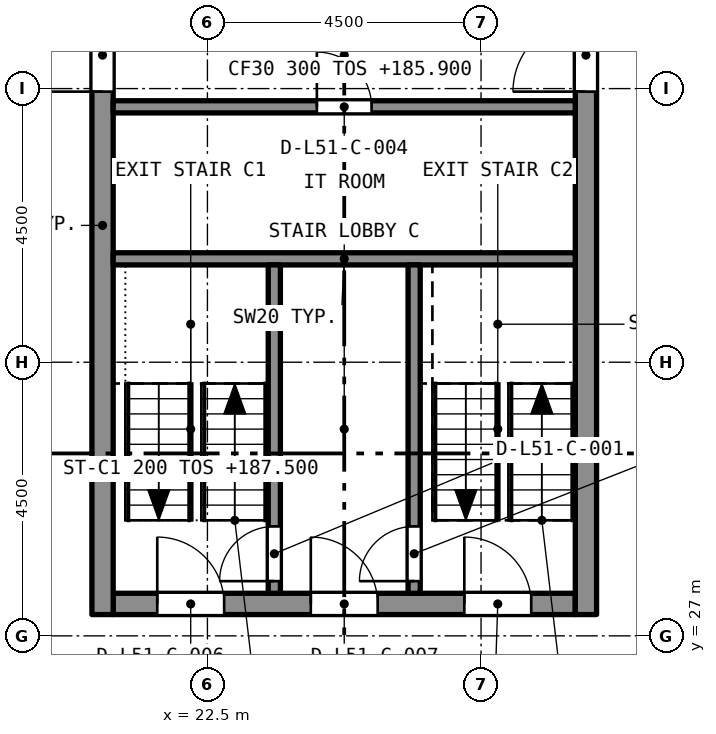
"""IFC4 building model, lengths in metres.
Left out: names, types, materials, properties, quantities, classifications, styles, units other than length and angle.
Written with IfcOpenShell. Run it as: python <this file> out.ifc"""

import sys

from ifc_helpers import new_model, si_unit, direction, frame, frame_2d, origin, place, context, subcontext, project, spatial, rectangle, extrude, element, fill, save


model = new_model("IFC4")
c1 = context("Model", 3, precision=1e-05, world=origin(), true_north=direction((0.0, 1.0)))
c2 = subcontext(c1, "Body", "Model", "MODEL_VIEW")
j1 = project(units=[si_unit("LENGTHUNIT", "METRE"), si_unit("PLANEANGLEUNIT", "RADIAN")], contexts=[c1])
p1 = place(None, origin())
s1 = spatial("IfcSite", under=j1, at=p1, CompositionType="ELEMENT")
p2 = place(p1, origin())
s2 = spatial("IfcBuilding", under=s1, at=p2, CompositionType="ELEMENT")
p3 = place(p2, frame((0.0, 0.0, 185.9)))
s3 = spatial("IfcBuildingStorey", under=s2, at=p3, CompositionType="ELEMENT", Elevation=185.9)
p4 = place(p3, frame((20.95, 27.525, 0.0), z_axis=(0.0, 0.0, 1.0), x_axis=(1.0, 0.0, 0.0)))
e1 = element("IfcWall", 1, at=p4, inside=s3, PredefinedType="SOLIDWALL", context=c2, shape_type="SweptSolid", body=[
    extrude(rectangle(XDim=7.6, YDim=0.35, at=frame_2d((3.8, 0.0))), origin(), (0.0, 0.0, 1.0), 3.2),
])
p5 = place(p4, frame((0.725, 0.0, 0.0)))
e2 = element("IfcOpeningElement", 2, at=p5, cuts=e1, PredefinedType="OPENING", context=c2, shape_type="SweptSolid", body=[
    extrude(rectangle(XDim=1.1, YDim=2.1, at=frame_2d((0.55, 1.05))), frame((0.0, 0.185, 0.0), z_axis=(0.0, -1.0, 0.0), x_axis=(1.0, 0.0, 0.0)), (0.0, 0.0, 1.0), 0.37),
])
p6 = place(p4, frame((3.25, 0.0, 0.0)))
e3 = element("IfcOpeningElement", 3, at=p6, cuts=e1, PredefinedType="OPENING", context=c2, shape_type="SweptSolid", body=[
    extrude(rectangle(XDim=1.1, YDim=2.1, at=frame_2d((0.55, 1.05))), frame((0.0, 0.185, 0.0), z_axis=(0.0, -1.0, 0.0), x_axis=(1.0, 0.0, 0.0)), (0.0, 0.0, 1.0), 0.37),
])
p7 = place(p4, frame((5.775, 0.0, 0.0)))
e4 = element("IfcOpeningElement", 4, at=p7, cuts=e1, PredefinedType="OPENING", context=c2, shape_type="SweptSolid", body=[
    extrude(rectangle(XDim=1.1, YDim=2.1, at=frame_2d((0.55, 1.05))), frame((0.0, 0.185, 0.0), z_axis=(0.0, -1.0, 0.0), x_axis=(1.0, 0.0, 0.0)), (0.0, 0.0, 1.0), 0.37),
])
p8 = place(p3, frame((20.775, 27.35, 0.0), z_axis=(0.0, 0.0, 1.0), x_axis=(0.0, 1.0, 0.0)))
e5 = element("IfcWall", 5, at=p8, inside=s3, PredefinedType="SOLIDWALL", context=c2, shape_type="SweptSolid", body=[
    extrude(rectangle(XDim=12.8, YDim=0.35, at=frame_2d((6.4, 0.0))), origin(), (0.0, 0.0, 1.0), 3.2),
])
p9 = place(p8, frame((8.6, 0.0, 0.0)))
e6 = element("IfcOpeningElement", 6, at=p9, cuts=e5, PredefinedType="OPENING", context=c2, shape_type="SweptSolid", body=[
    extrude(rectangle(XDim=1.2, YDim=2.1, at=frame_2d((0.6, 1.05))), frame((0.0, 0.185, 0.0), z_axis=(0.0, -1.0, 0.0), x_axis=(1.0, 0.0, 0.0)), (0.0, 0.0, 1.0), 0.37),
])
p10 = place(p3, frame((28.725, 27.35, 0.0), z_axis=(0.0, 0.0, 1.0), x_axis=(0.0, 1.0, 0.0)))
e7 = element("IfcWall", 7, at=p10, inside=s3, PredefinedType="SOLIDWALL", context=c2, shape_type="SweptSolid", body=[
    extrude(rectangle(XDim=12.8, YDim=0.35, at=frame_2d((6.4, 0.0))), origin(), (0.0, 0.0, 1.0), 3.2),
])
p11 = place(p10, frame((8.6, 0.0, 0.0)))
e8 = element("IfcOpeningElement", 8, at=p11, cuts=e7, PredefinedType="OPENING", context=c2, shape_type="SweptSolid", body=[
    extrude(rectangle(XDim=1.2, YDim=2.1, at=frame_2d((0.6, 1.05))), frame((0.0, 0.185, 0.0), z_axis=(0.0, -1.0, 0.0), x_axis=(1.0, 0.0, 0.0)), (0.0, 0.0, 1.0), 0.37),
])
p12 = place(p3, frame((20.95, 33.2, 0.0), z_axis=(0.0, 0.0, 1.0), x_axis=(1.0, 0.0, 0.0)))
e9 = element("IfcWall", 9, at=p12, inside=s3, PredefinedType="SOLIDWALL", context=c2, shape_type="SweptSolid", body=[
    extrude(rectangle(XDim=7.6, YDim=0.2, at=frame_2d((3.8, 0.0))), origin(), (0.0, 0.0, 1.0), 2.9),
])
p13 = place(p3, frame((20.95, 35.7, 0.0), z_axis=(0.0, 0.0, 1.0), x_axis=(1.0, 0.0, 0.0)))
e10 = element("IfcWall", 10, at=p13, inside=s3, PredefinedType="SOLIDWALL", context=c2, shape_type="SweptSolid", body=[
    extrude(rectangle(XDim=7.6, YDim=0.2, at=frame_2d((3.8, 0.0))), origin(), (0.0, 0.0, 1.0), 2.9),
])
p14 = place(p13, frame((3.35, 0.0, 0.0)))
e11 = element("IfcOpeningElement", 11, at=p14, cuts=e10, PredefinedType="OPENING", context=c2, shape_type="SweptSolid", body=[
    extrude(rectangle(XDim=0.9, YDim=2.1, at=frame_2d((0.45, 1.05))), frame((0.0, 0.11, 0.0), z_axis=(0.0, -1.0, 0.0), x_axis=(1.0, 0.0, 0.0)), (0.0, 0.0, 1.0), 0.22),
])
p15 = place(p3, frame((23.6, 27.7, 0.0), z_axis=(0.0, 0.0, 1.0), x_axis=(0.0, 1.0, 0.0)))
e12 = element("IfcWall", 12, at=p15, inside=s3, PredefinedType="SOLIDWALL", context=c2, shape_type="SweptSolid", body=[
    extrude(rectangle(XDim=5.4, YDim=0.2, at=frame_2d((2.7, 0.0))), origin(), (0.0, 0.0, 1.0), 2.9),
])
p16 = place(p15, frame((0.2, 0.0, 0.0)))
e13 = element("IfcOpeningElement", 13, at=p16, cuts=e12, PredefinedType="OPENING", context=c2, shape_type="SweptSolid", body=[
    extrude(rectangle(XDim=0.9, YDim=2.1, at=frame_2d((0.45, 1.05))), frame((0.0, 0.11, 0.0), z_axis=(0.0, -1.0, 0.0), x_axis=(1.0, 0.0, 0.0)), (0.0, 0.0, 1.0), 0.22),
])
p17 = place(p3, frame((25.9, 27.7, 0.0), z_axis=(0.0, 0.0, 1.0), x_axis=(0.0, 1.0, 0.0)))
e14 = element("IfcWall", 14, at=p17, inside=s3, PredefinedType="SOLIDWALL", context=c2, shape_type="SweptSolid", body=[
    extrude(rectangle(XDim=5.4, YDim=0.2, at=frame_2d((2.7, 0.0))), origin(), (0.0, 0.0, 1.0), 2.9),
])
p18 = place(p17, frame((0.2, 0.0, 0.0)))
e15 = element("IfcOpeningElement", 15, at=p18, cuts=e14, PredefinedType="OPENING", context=c2, shape_type="SweptSolid", body=[
    extrude(rectangle(XDim=0.9, YDim=2.1, at=frame_2d((0.45, 1.05))), frame((0.0, 0.11, 0.0), z_axis=(0.0, -1.0, 0.0), x_axis=(1.0, 0.0, 0.0)), (0.0, 0.0, 1.0), 0.22),
])
p19 = place(p16, origin())
e16 = element("IfcDoor", 16, at=p19, inside=s3, OperationType="SINGLE_SWING_LEFT", PredefinedType="DOOR", context=c2, shape_type="SweptSolid", body=[
    extrude(rectangle(XDim=0.9, YDim=2.1, at=frame_2d((0.45, 1.05))), frame((0.0, 0.025, 0.0), z_axis=(0.0, -1.0, 0.0), x_axis=(1.0, 0.0, 0.0)), (0.0, 0.0, 1.0), 0.05),
])
fill(e13, e16)
p20 = place(p18, origin())
e17 = element("IfcDoor", 17, at=p20, inside=s3, OperationType="SINGLE_SWING_LEFT", PredefinedType="DOOR", context=c2, shape_type="SweptSolid", body=[
    extrude(rectangle(XDim=0.9, YDim=2.1, at=frame_2d((0.45, 1.05))), frame((0.0, 0.025, 0.0), z_axis=(0.0, -1.0, 0.0), x_axis=(1.0, 0.0, 0.0)), (0.0, 0.0, 1.0), 0.05),
])
fill(e15, e17)
p21 = place(p14, origin())
e18 = element("IfcDoor", 18, at=p21, inside=s3, OperationType="SINGLE_SWING_LEFT", PredefinedType="DOOR", context=c2, shape_type="SweptSolid", body=[
    extrude(rectangle(XDim=0.9, YDim=2.1, at=frame_2d((0.45, 1.05))), frame((0.0, 0.025, 0.0), z_axis=(0.0, -1.0, 0.0), x_axis=(1.0, 0.0, 0.0)), (0.0, 0.0, 1.0), 0.05),
])
fill(e11, e18)
p22 = place(p5, origin())
e19 = element("IfcDoor", 19, at=p22, inside=s3, OperationType="SINGLE_SWING_LEFT", PredefinedType="DOOR", context=c2, shape_type="SweptSolid", body=[
    extrude(rectangle(XDim=1.1, YDim=2.1, at=frame_2d((0.55, 1.05))), frame((0.0, 0.025, 0.0), z_axis=(0.0, -1.0, 0.0), x_axis=(1.0, 0.0, 0.0)), (0.0, 0.0, 1.0), 0.05),
])
fill(e2, e19)
p23 = place(p6, origin())
e20 = element("IfcDoor", 20, at=p23, inside=s3, OperationType="SINGLE_SWING_LEFT", PredefinedType="DOOR", context=c2, shape_type="SweptSolid", body=[
    extrude(rectangle(XDim=1.1, YDim=2.1, at=frame_2d((0.55, 1.05))), frame((0.0, 0.025, 0.0), z_axis=(0.0, -1.0, 0.0), x_axis=(1.0, 0.0, 0.0)), (0.0, 0.0, 1.0), 0.05),
])
fill(e3, e20)
p24 = place(p7, origin())
e21 = element("IfcDoor", 21, at=p24, inside=s3, OperationType="SINGLE_SWING_LEFT", PredefinedType="DOOR", context=c2, shape_type="SweptSolid", body=[
    extrude(rectangle(XDim=1.1, YDim=2.1, at=frame_2d((0.55, 1.05))), frame((0.0, 0.025, 0.0), z_axis=(0.0, -1.0, 0.0), x_axis=(1.0, 0.0, 0.0)), (0.0, 0.0, 1.0), 0.05),
])
fill(e4, e21)
p25 = place(p9, origin())
e22 = element("IfcDoor", 22, at=p25, inside=s3, OperationType="SINGLE_SWING_LEFT", PredefinedType="DOOR", context=c2, shape_type="SweptSolid", body=[
    extrude(rectangle(XDim=1.2, YDim=2.1, at=frame_2d((0.6, 1.05))), frame((0.0, 0.025, 0.0), z_axis=(0.0, -1.0, 0.0), x_axis=(1.0, 0.0, 0.0)), (0.0, 0.0, 1.0), 0.05),
])
fill(e6, e22)
p26 = place(p11, origin())
e23 = element("IfcDoor", 23, at=p26, inside=s3, OperationType="SINGLE_SWING_LEFT", PredefinedType="DOOR", context=c2, shape_type="SweptSolid", body=[
    extrude(rectangle(XDim=1.2, YDim=2.1, at=frame_2d((0.6, 1.05))), frame((0.0, 0.025, 0.0), z_axis=(0.0, -1.0, 0.0), x_axis=(1.0, 0.0, 0.0)), (0.0, 0.0, 1.0), 0.05),
])
fill(e8, e23)
save(model, sys.argv[1])
